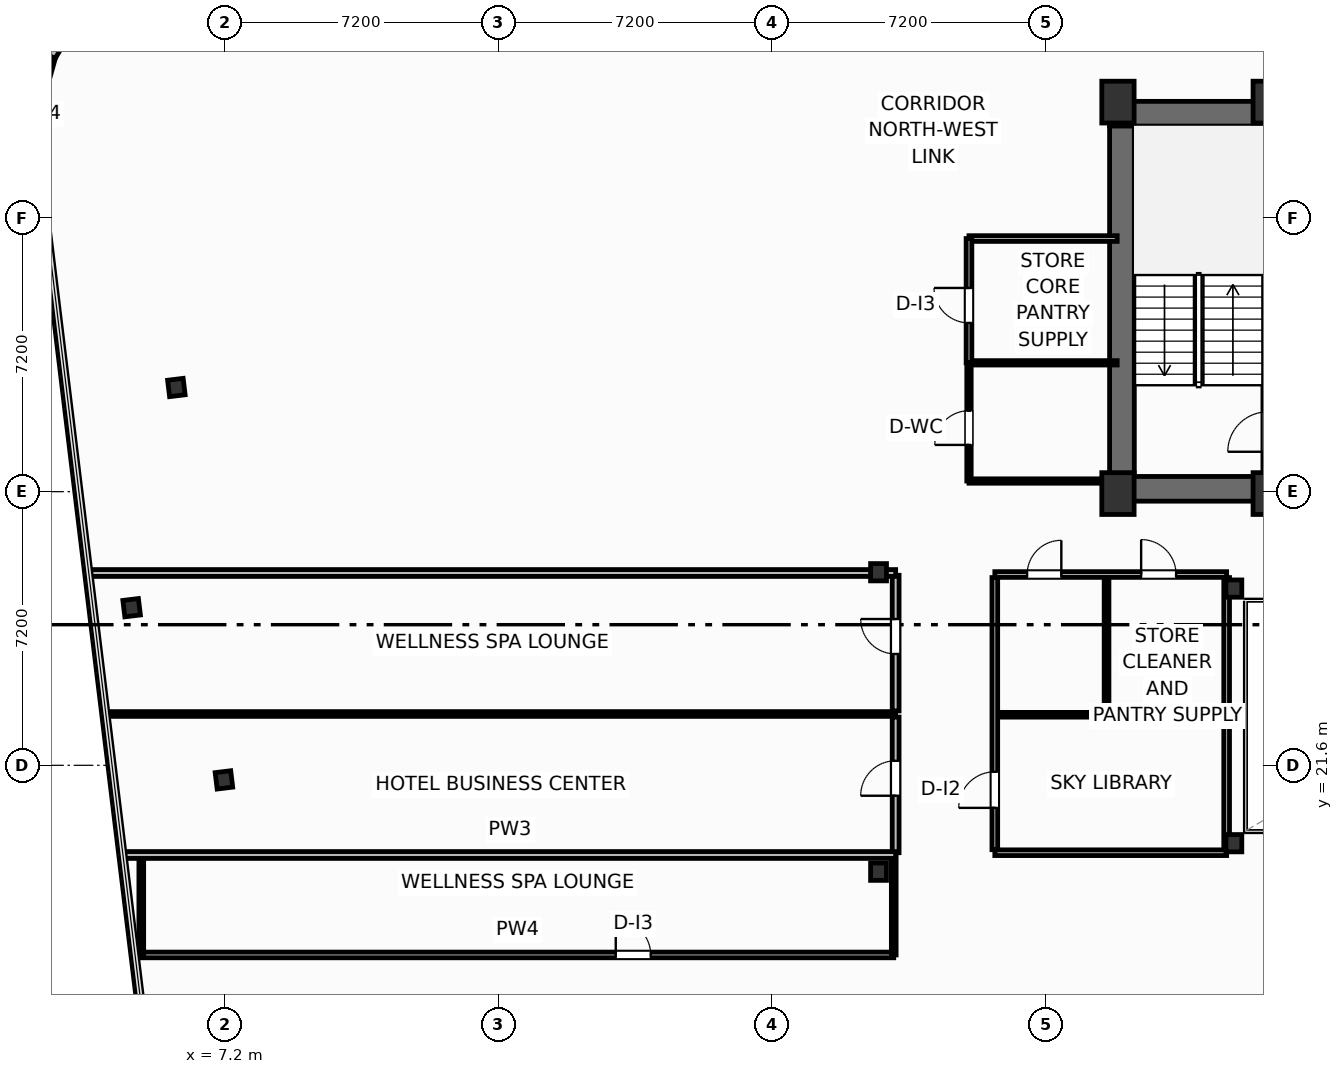
"""IFC4 building model, lengths in metres.
Left out: names, types, materials, properties, quantities, classifications, styles, units other than length and angle.
Written with IfcOpenShell. Run it as: python <this file> out.ifc"""

import sys

from ifc_helpers import new_model, si_unit, direction, frame, frame_2d, origin, origin_2d, place, context, subcontext, project, spatial, rectangle, i_section, extrude, element, fill, save


model = new_model("IFC4")
c1 = context("Model", 3, precision=1e-05, world=origin(), true_north=direction((0.0, 1.0)))
c2 = subcontext(c1, "Body", "Model", "MODEL_VIEW")
j1 = project(units=[si_unit("LENGTHUNIT", "METRE"), si_unit("PLANEANGLEUNIT", "RADIAN")], contexts=[c1])
p1 = place(None, origin())
s1 = spatial("IfcSite", under=j1, at=p1, CompositionType="ELEMENT")
p2 = place(p1, origin())
s2 = spatial("IfcBuilding", under=s1, at=p2, CompositionType="ELEMENT")
p3 = place(p2, frame((0.0, 0.0, 178.3)))
s3 = spatial("IfcBuildingStorey", under=s2, at=p3, CompositionType="ELEMENT", Elevation=178.3)
for number, where, z_axis, x_axis in (
    (1, (30.7, 28.75, 0.0), (0.0, 0.0, 1.0), (1.0, 0.0, 0.0)),
    (2, (34.68, 28.75, 0.0), (0.0, 0.0, 1.0), (1.0, 0.0, 0.0)),
    (3, (30.7, 39.05, 0.0), (0.0, 0.0, 1.0), (1.0, 0.0, 0.0)),
    (4, (34.68, 39.05, 0.0), (0.0, 0.0, 1.0), (1.0, 0.0, 0.0)),
):
    element("IfcColumn", number, at=place(p3, frame(where, z_axis=z_axis, x_axis=x_axis)), inside=s3, PredefinedType="COLUMN", context=c2, shape_type="SweptSolid", body=[
        extrude(rectangle(XDim=0.85, YDim=1.1, at=origin_2d()), origin(), (0.0, 0.0, 1.0), 3.7),
    ])
for number, where, z_axis, x_axis in (
    (5, (33.75, 19.55, 0.0), (0.0, 0.0, 1.0), (1.0, 0.0, 0.0)),
    (6, (33.75, 26.25, 0.0), (0.0, 0.0, 1.0), (1.0, 0.0, 0.0)),
    (7, (24.4, 18.8, 0.0), (0.0, 0.0, 1.0), (1.0, 0.0, 0.0)),
    (8, (24.4, 26.68, 0.0), (0.0, 0.0, 1.0), (1.0, 0.0, 0.0)),
):
    element("IfcColumn", number, at=place(p3, frame(where, z_axis=z_axis, x_axis=x_axis)), inside=s3, PredefinedType="COLUMN", context=c2, shape_type="SweptSolid", body=[
        extrude(i_section(OverallWidth=0.418, OverallDepth=0.455, WebThickness=0.042, FlangeThickness=0.068, FilletRadius=0.025, at=origin_2d()), origin(), (0.0, 0.0, 1.0), 3.7),
    ])
p4 = place(p3, frame((30.48, 38.745, 0.0), z_axis=(0.0, 0.0, 1.0), x_axis=(1.0, 0.0, 0.0)))
e9 = element("IfcWall", 9, at=p4, inside=s3, PredefinedType="SHEAR", context=c2, shape_type="SweptSolid", body=[
    extrude(rectangle(XDim=17.44, YDim=0.65, at=frame_2d((8.72, 0.0))), origin(), (0.0, 0.0, 1.0), 3.45),
])
p5 = place(p3, frame((30.805, 29.2, 0.0), z_axis=(0.0, 0.0, 1.0), x_axis=(0.0, 1.0, 0.0)))
e10 = element("IfcWall", 10, at=p5, inside=s3, PredefinedType="SHEAR", context=c2, shape_type="SweptSolid", body=[
    extrude(rectangle(XDim=9.22, YDim=0.65, at=frame_2d((4.61, 0.0))), origin(), (0.0, 0.0, 1.0), 3.45),
])
p6 = place(p3, frame((30.48, 28.875, 0.0), z_axis=(0.0, 0.0, 1.0), x_axis=(1.0, 0.0, 0.0)))
e11 = element("IfcWall", 11, at=p6, inside=s3, PredefinedType="SHEAR", context=c2, shape_type="SweptSolid", body=[
    extrude(rectangle(XDim=4.32, YDim=0.65, at=frame_2d((2.16, 0.0))), origin(), (0.0, 0.0, 1.0), 3.45),
])
p7 = place(p3, frame((34.64, 29.2, 0.0), z_axis=(0.0, 0.0, 1.0), x_axis=(0.0, 1.0, 0.0)))
e12 = element("IfcWall", 12, at=p7, inside=s3, PredefinedType="SHEAR", context=c2, shape_type="SweptSolid", body=[
    extrude(rectangle(XDim=9.22, YDim=0.25, at=frame_2d((4.61, 0.0))), origin(), (0.0, 0.0, 1.0), 3.45),
])
p8 = place(p7, frame((0.65, 0.0, 0.0)))
e13 = element("IfcOpeningElement", 13, at=p8, cuts=e12, PredefinedType="OPENING", context=c2, shape_type="SweptSolid", body=[
    extrude(rectangle(XDim=1.05, YDim=2.15, at=frame_2d((0.525, 1.075))), frame((0.0, 0.135, 0.0), z_axis=(0.0, -1.0, 0.0), x_axis=(1.0, 0.0, 0.0)), (0.0, 0.0, 1.0), 0.27),
])
for number, where, z_axis, x_axis in (
    (14, (5.923, 31.541, 0.0), (0.0, 0.0, 1.0), (0.993, 0.12, 0.0)),
    (15, (4.746, 25.747, 0.0), (0.0, 0.0, 1.0), (0.993, 0.12, 0.0)),
    (16, (7.175, 21.216, 0.0), (0.0, 0.0, 1.0), (0.993, 0.12, 0.0)),
):
    element("IfcColumn", number, at=place(p3, frame(where, z_axis=z_axis, x_axis=x_axis)), inside=s3, PredefinedType="COLUMN", context=c2, shape_type="SweptSolid", body=[
        extrude(i_section(OverallWidth=0.412, OverallDepth=0.435, WebThickness=0.036, FlangeThickness=0.057, FilletRadius=0.025, at=origin_2d()), origin(), (0.0, 0.0, 1.0), 3.7),
    ])
p9 = place(p3, frame((3.299, 41.368, 0.0), z_axis=(0.0, 0.0, 1.0), x_axis=(-0.508716668029, -0.860933999601, 0.0)))
e17 = element("IfcWall", 17, at=p9, inside=s3, PredefinedType="SOLIDWALL", context=c2, shape_type="SweptSolid", body=[
    extrude(rectangle(XDim=1.301, YDim=0.22, at=frame_2d((0.65, 0.0))), origin(), (0.0, 0.0, 1.0), 2.73),
])
p10 = place(p3, frame((2.63, 40.224, 0.0), z_axis=(0.0, 0.0, 1.0), x_axis=(-0.26876657226, -0.963205341366, 0.0)))
e18 = element("IfcWall", 18, at=p10, inside=s3, PredefinedType="SOLIDWALL", context=c2, shape_type="SweptSolid", body=[
    extrude(rectangle(XDim=1.301, YDim=0.22, at=frame_2d((0.65, 0.0))), origin(), (0.0, 0.0, 1.0), 2.73),
])
p11 = place(p3, frame((5.0, 16.61, 0.0), z_axis=(0.0, 0.0, 1.0), x_axis=(1.0, 0.0, 0.0)))
e19 = element("IfcWall", 19, at=p11, inside=s3, PredefinedType="PARTITIONING", context=c2, shape_type="SweptSolid", body=[
    extrude(rectangle(XDim=19.8, YDim=0.15, at=frame_2d((9.9, 0.0))), origin(), (0.0, 0.0, 1.0), 3.45),
])
p12 = place(p11, frame((12.485, 0.0, 0.0)))
e20 = element("IfcOpeningElement", 20, at=p12, cuts=e19, PredefinedType="OPENING", context=c2, shape_type="SweptSolid", body=[
    extrude(rectangle(XDim=0.92, YDim=2.05, at=frame_2d((0.46, 1.025))), frame((0.0, 0.085, 0.0), z_axis=(0.0, -1.0, 0.0), x_axis=(1.0, 0.0, 0.0)), (0.0, 0.0, 1.0), 0.17),
])
for number, where, z_axis, x_axis in (
    (21, (5.0, 16.61, 0.0), (0.0, 0.0, 1.0), (0.0, 1.0, 0.0)),
    (22, (24.8, 16.61, 0.0), (0.0, 0.0, 1.0), (0.0, 1.0, 0.0)),
):
    element("IfcWall", number, at=place(p3, frame(where, z_axis=z_axis, x_axis=x_axis)), inside=s3, PredefinedType="PARTITIONING", context=c2, shape_type="SweptSolid", body=[
        extrude(rectangle(XDim=2.63, YDim=0.125, at=frame_2d((1.315, 0.0))), origin(), (0.0, 0.0, 1.0), 3.45),
    ])
p13 = place(p3, frame((24.85, 19.3, 0.0), z_axis=(0.0, 0.0, 1.0), x_axis=(0.0, 1.0, 0.0)))
e23 = element("IfcWall", 23, at=p13, inside=s3, PredefinedType="PARTITIONING", context=c2, shape_type="SweptSolid", body=[
    extrude(rectangle(XDim=3.57, YDim=0.18, at=frame_2d((1.785, 0.0))), origin(), (0.0, 0.0, 1.0), 3.45),
])
p14 = place(p13, frame((1.5, 0.0, 0.0)))
e24 = element("IfcOpeningElement", 24, at=p14, cuts=e23, PredefinedType="OPENING", context=c2, shape_type="SweptSolid", body=[
    extrude(rectangle(XDim=0.92, YDim=2.05, at=frame_2d((0.46, 1.025))), frame((0.0, 0.1, 0.0), z_axis=(0.0, -1.0, 0.0), x_axis=(1.0, 0.0, 0.0)), (0.0, 0.0, 1.0), 0.2),
])
p15 = place(p3, frame((24.85, 23.03, 0.0), z_axis=(0.0, 0.0, 1.0), x_axis=(0.0, 1.0, 0.0)))
e25 = element("IfcWall", 25, at=p15, inside=s3, PredefinedType="PARTITIONING", context=c2, shape_type="SweptSolid", body=[
    extrude(rectangle(XDim=3.57, YDim=0.18, at=frame_2d((1.785, 0.0))), origin(), (0.0, 0.0, 1.0), 3.45),
])
p16 = place(p15, frame((1.5, 0.0, 0.0)))
e26 = element("IfcOpeningElement", 26, at=p16, cuts=e25, PredefinedType="OPENING", context=c2, shape_type="SweptSolid", body=[
    extrude(rectangle(XDim=0.92, YDim=2.05, at=frame_2d((0.46, 1.025))), frame((0.0, 0.1, 0.0), z_axis=(0.0, -1.0, 0.0), x_axis=(1.0, 0.0, 0.0)), (0.0, 0.0, 1.0), 0.2),
])
p17 = place(p3, frame((4.107, 22.95, 0.0), z_axis=(0.0, 0.0, 1.0), x_axis=(1.0, 0.0, 0.0)))
e27 = element("IfcWall", 27, at=p17, inside=s3, PredefinedType="PARTITIONING", context=c2, shape_type="SweptSolid", body=[
    extrude(rectangle(XDim=20.743, YDim=0.125, at=frame_2d((10.371, 0.0))), origin(), (0.0, 0.0, 1.0), 2.662),
])
p18 = place(p3, frame((4.557, 19.24, 0.0), z_axis=(0.0, 0.0, 1.0), x_axis=(1.0, 0.0, 0.0)))
e28 = element("IfcWall", 28, at=p18, inside=s3, PredefinedType="PARTITIONING", context=c2, shape_type="SweptSolid", body=[
    extrude(rectangle(XDim=20.293, YDim=0.18, at=frame_2d((10.146, 0.0))), origin(), (0.0, 0.0, 1.0), 3.45),
])
p19 = place(p3, frame((3.658, 26.66, 0.0), z_axis=(0.0, 0.0, 1.0), x_axis=(1.0, 0.0, 0.0)))
e29 = element("IfcWall", 29, at=p19, inside=s3, PredefinedType="PARTITIONING", context=c2, shape_type="SweptSolid", body=[
    extrude(rectangle(XDim=21.192, YDim=0.18, at=frame_2d((10.596, 0.0))), origin(), (0.0, 0.0, 1.0), 2.662),
])
p20 = place(p3, frame((27.46, 19.3, 0.0), z_axis=(0.0, 0.0, 1.0), x_axis=(1.0, 0.0, 0.0)))
e30 = element("IfcWall", 30, at=p20, inside=s3, PredefinedType="PARTITIONING", context=c2, shape_type="SweptSolid", body=[
    extrude(rectangle(XDim=6.1, YDim=0.15, at=frame_2d((3.05, 0.0))), origin(), (0.0, 0.0, 1.0), 2.662),
])
p21 = place(p3, frame((27.46, 26.62, 0.0), z_axis=(0.0, 0.0, 1.0), x_axis=(1.0, 0.0, 0.0)))
e31 = element("IfcWall", 31, at=p21, inside=s3, PredefinedType="PARTITIONING", context=c2, shape_type="SweptSolid", body=[
    extrude(rectangle(XDim=6.1, YDim=0.15, at=frame_2d((3.05, 0.0))), origin(), (0.0, 0.0, 1.0), 2.662),
])
p22 = place(p21, frame((0.85, 0.0, 0.0)))
e32 = element("IfcOpeningElement", 32, at=p22, cuts=e31, PredefinedType="OPENING", context=c2, shape_type="SweptSolid", body=[
    extrude(rectangle(XDim=0.9, YDim=2.05, at=frame_2d((0.45, 1.025))), frame((0.0, 0.085, 0.0), z_axis=(0.0, -1.0, 0.0), x_axis=(1.0, 0.0, 0.0)), (0.0, 0.0, 1.0), 0.17),
])
p23 = place(p21, frame((3.85, 0.0, 0.0)))
e33 = element("IfcOpeningElement", 33, at=p23, cuts=e31, PredefinedType="OPENING", context=c2, shape_type="SweptSolid", body=[
    extrude(rectangle(XDim=0.92, YDim=2.05, at=frame_2d((0.46, 1.025))), frame((0.0, 0.085, 0.0), z_axis=(0.0, -1.0, 0.0), x_axis=(1.0, 0.0, 0.0)), (0.0, 0.0, 1.0), 0.17),
])
p24 = place(p3, frame((27.52, 22.93, 0.0), z_axis=(0.0, 0.0, 1.0), x_axis=(1.0, 0.0, 0.0)))
e34 = element("IfcWall", 34, at=p24, inside=s3, PredefinedType="PARTITIONING", context=c2, shape_type="SweptSolid", body=[
    extrude(rectangle(XDim=6.0, YDim=0.125, at=frame_2d((3.0, 0.0))), origin(), (0.0, 0.0, 1.0), 3.45),
])
p25 = place(p3, frame((30.4, 23.0, 0.0), z_axis=(0.0, 0.0, 1.0), x_axis=(0.0, 1.0, 0.0)))
e35 = element("IfcWall", 35, at=p25, inside=s3, PredefinedType="PARTITIONING", context=c2, shape_type="SweptSolid", body=[
    extrude(rectangle(XDim=3.54, YDim=0.125, at=frame_2d((1.77, 0.0))), origin(), (0.0, 0.0, 1.0), 3.45),
])
p26 = place(p3, frame((27.46, 19.38, 0.0), z_axis=(0.0, 0.0, 1.0), x_axis=(0.0, 1.0, 0.0)))
e36 = element("IfcWall", 36, at=p26, inside=s3, PredefinedType="PARTITIONING", context=c2, shape_type="SweptSolid", body=[
    extrude(rectangle(XDim=7.16, YDim=0.15, at=frame_2d((3.58, 0.0))), origin(), (0.0, 0.0, 1.0), 3.45),
])
p27 = place(p26, frame((1.1, 0.0, 0.0)))
e37 = element("IfcOpeningElement", 37, at=p27, cuts=e36, PredefinedType="OPENING", context=c2, shape_type="SweptSolid", body=[
    extrude(rectangle(XDim=0.95, YDim=2.05, at=frame_2d((0.475, 1.025))), frame((0.0, 0.085, 0.0), z_axis=(0.0, -1.0, 0.0), x_axis=(1.0, 0.0, 0.0)), (0.0, 0.0, 1.0), 0.17),
])
p28 = place(p3, frame((33.56, 19.38, 0.0), z_axis=(0.0, 0.0, 1.0), x_axis=(0.0, 1.0, 0.0)))
e38 = element("IfcWall", 38, at=p28, inside=s3, PredefinedType="PARTITIONING", context=c2, shape_type="SweptSolid", body=[
    extrude(rectangle(XDim=7.16, YDim=0.15, at=frame_2d((3.58, 0.0))), origin(), (0.0, 0.0, 1.0), 2.824),
])
p29 = place(p3, frame((26.8, 32.19, 0.0), z_axis=(0.0, 0.0, 1.0), x_axis=(1.0, 0.0, 0.0)))
e39 = element("IfcWall", 39, at=p29, inside=s3, PredefinedType="PARTITIONING", context=c2, shape_type="SweptSolid", body=[
    extrude(rectangle(XDim=3.88, YDim=0.115, at=frame_2d((1.94, 0.0))), origin(), (0.0, 0.0, 1.0), 3.45),
])
p30 = place(p3, frame((26.78, 29.08, 0.0), z_axis=(0.0, 0.0, 1.0), x_axis=(1.0, 0.0, 0.0)))
e40 = element("IfcWall", 40, at=p30, inside=s3, PredefinedType="PARTITIONING", context=c2, shape_type="SweptSolid", body=[
    extrude(rectangle(XDim=3.7, YDim=0.115, at=frame_2d((1.85, 0.0))), origin(), (0.0, 0.0, 1.0), 3.45),
])
p31 = place(p3, frame((26.78, 35.46, 0.0), z_axis=(0.0, 0.0, 1.0), x_axis=(1.0, 0.0, 0.0)))
e41 = element("IfcWall", 41, at=p31, inside=s3, PredefinedType="PARTITIONING", context=c2, shape_type="SweptSolid", body=[
    extrude(rectangle(XDim=3.9, YDim=0.15, at=frame_2d((1.95, 0.0))), origin(), (0.0, 0.0, 1.0), 3.45),
])
p32 = place(p3, frame((26.78, 29.08, 0.0), z_axis=(0.0, 0.0, 1.0), x_axis=(0.0, 1.0, 0.0)))
e42 = element("IfcWall", 42, at=p32, inside=s3, PredefinedType="PARTITIONING", context=c2, shape_type="SweptSolid", body=[
    extrude(rectangle(XDim=3.11, YDim=0.115, at=frame_2d((1.555, 0.0))), origin(), (0.0, 0.0, 1.0), 3.45),
])
p33 = place(p32, frame((0.95, 0.0, 0.0)))
e43 = element("IfcOpeningElement", 43, at=p33, cuts=e42, PredefinedType="OPENING", context=c2, shape_type="SweptSolid", body=[
    extrude(rectangle(XDim=0.9, YDim=2.05, at=frame_2d((0.45, 1.025))), frame((0.0, 0.067, 0.0), z_axis=(0.0, -1.0, 0.0), x_axis=(1.0, 0.0, 0.0)), (0.0, 0.0, 1.0), 0.135),
])
p34 = place(p3, frame((26.78, 32.19, 0.0), z_axis=(0.0, 0.0, 1.0), x_axis=(0.0, 1.0, 0.0)))
e44 = element("IfcWall", 44, at=p34, inside=s3, PredefinedType="PARTITIONING", context=c2, shape_type="SweptSolid", body=[
    extrude(rectangle(XDim=3.27, YDim=0.15, at=frame_2d((1.635, 0.0))), origin(), (0.0, 0.0, 1.0), 3.45),
])
p35 = place(p34, frame((1.05, 0.0, 0.0)))
e45 = element("IfcOpeningElement", 45, at=p35, cuts=e44, PredefinedType="OPENING", context=c2, shape_type="SweptSolid", body=[
    extrude(rectangle(XDim=0.92, YDim=2.05, at=frame_2d((0.46, 1.025))), frame((0.0, 0.085, 0.0), z_axis=(0.0, -1.0, 0.0), x_axis=(1.0, 0.0, 0.0)), (0.0, 0.0, 1.0), 0.17),
])
p36 = place(p12, origin())
e46 = element("IfcDoor", 46, at=p36, inside=s3, OperationType="SINGLE_SWING_LEFT", PredefinedType="DOOR", context=c2, shape_type="SweptSolid", body=[
    extrude(rectangle(XDim=0.92, YDim=2.05, at=frame_2d((0.46, 1.025))), frame((0.0, 0.025, 0.0), z_axis=(0.0, -1.0, 0.0), x_axis=(1.0, 0.0, 0.0)), (0.0, 0.0, 1.0), 0.05),
])
fill(e20, e46)
p37 = place(p14, origin())
e47 = element("IfcDoor", 47, at=p37, inside=s3, OperationType="SINGLE_SWING_LEFT", PredefinedType="DOOR", context=c2, shape_type="SweptSolid", body=[
    extrude(rectangle(XDim=0.92, YDim=2.05, at=frame_2d((0.46, 1.025))), frame((0.0, 0.025, 0.0), z_axis=(0.0, -1.0, 0.0), x_axis=(1.0, 0.0, 0.0)), (0.0, 0.0, 1.0), 0.05),
])
fill(e24, e47)
p38 = place(p16, origin())
e48 = element("IfcDoor", 48, at=p38, inside=s3, OperationType="SINGLE_SWING_RIGHT", PredefinedType="DOOR", context=c2, shape_type="SweptSolid", body=[
    extrude(rectangle(XDim=0.92, YDim=2.05, at=frame_2d((0.46, 1.025))), frame((0.0, 0.025, 0.0), z_axis=(0.0, -1.0, 0.0), x_axis=(1.0, 0.0, 0.0)), (0.0, 0.0, 1.0), 0.05),
])
fill(e26, e48)
p39 = place(p22, origin())
e49 = element("IfcDoor", 49, at=p39, inside=s3, OperationType="SINGLE_SWING_RIGHT", PredefinedType="DOOR", context=c2, shape_type="SweptSolid", body=[
    extrude(rectangle(XDim=0.9, YDim=2.05, at=frame_2d((0.45, 1.025))), frame((0.0, 0.025, 0.0), z_axis=(0.0, -1.0, 0.0), x_axis=(1.0, 0.0, 0.0)), (0.0, 0.0, 1.0), 0.05),
])
fill(e32, e49)
p40 = place(p23, origin())
e50 = element("IfcDoor", 50, at=p40, inside=s3, OperationType="SINGLE_SWING_LEFT", PredefinedType="DOOR", context=c2, shape_type="SweptSolid", body=[
    extrude(rectangle(XDim=0.92, YDim=2.05, at=frame_2d((0.46, 1.025))), frame((0.0, 0.025, 0.0), z_axis=(0.0, -1.0, 0.0), x_axis=(1.0, 0.0, 0.0)), (0.0, 0.0, 1.0), 0.05),
])
fill(e33, e50)
p41 = place(p27, origin())
e51 = element("IfcDoor", 51, at=p41, inside=s3, OperationType="SINGLE_SWING_LEFT", PredefinedType="DOOR", context=c2, shape_type="SweptSolid", body=[
    extrude(rectangle(XDim=0.95, YDim=2.05, at=frame_2d((0.475, 1.025))), frame((0.0, 0.025, 0.0), z_axis=(0.0, -1.0, 0.0), x_axis=(1.0, 0.0, 0.0)), (0.0, 0.0, 1.0), 0.05),
])
fill(e37, e51)
p42 = place(p33, origin())
e52 = element("IfcDoor", 52, at=p42, inside=s3, OperationType="SINGLE_SWING_LEFT", PredefinedType="DOOR", context=c2, shape_type="SweptSolid", body=[
    extrude(rectangle(XDim=0.9, YDim=2.05, at=frame_2d((0.45, 1.025))), frame((0.0, 0.025, 0.0), z_axis=(0.0, -1.0, 0.0), x_axis=(1.0, 0.0, 0.0)), (0.0, 0.0, 1.0), 0.05),
])
fill(e43, e52)
p43 = place(p35, origin())
e53 = element("IfcDoor", 53, at=p43, inside=s3, OperationType="SINGLE_SWING_RIGHT", PredefinedType="DOOR", context=c2, shape_type="SweptSolid", body=[
    extrude(rectangle(XDim=0.92, YDim=2.05, at=frame_2d((0.46, 1.025))), frame((0.0, 0.025, 0.0), z_axis=(0.0, -1.0, 0.0), x_axis=(1.0, 0.0, 0.0)), (0.0, 0.0, 1.0), 0.05),
])
fill(e45, e53)
save(model, sys.argv[1])
